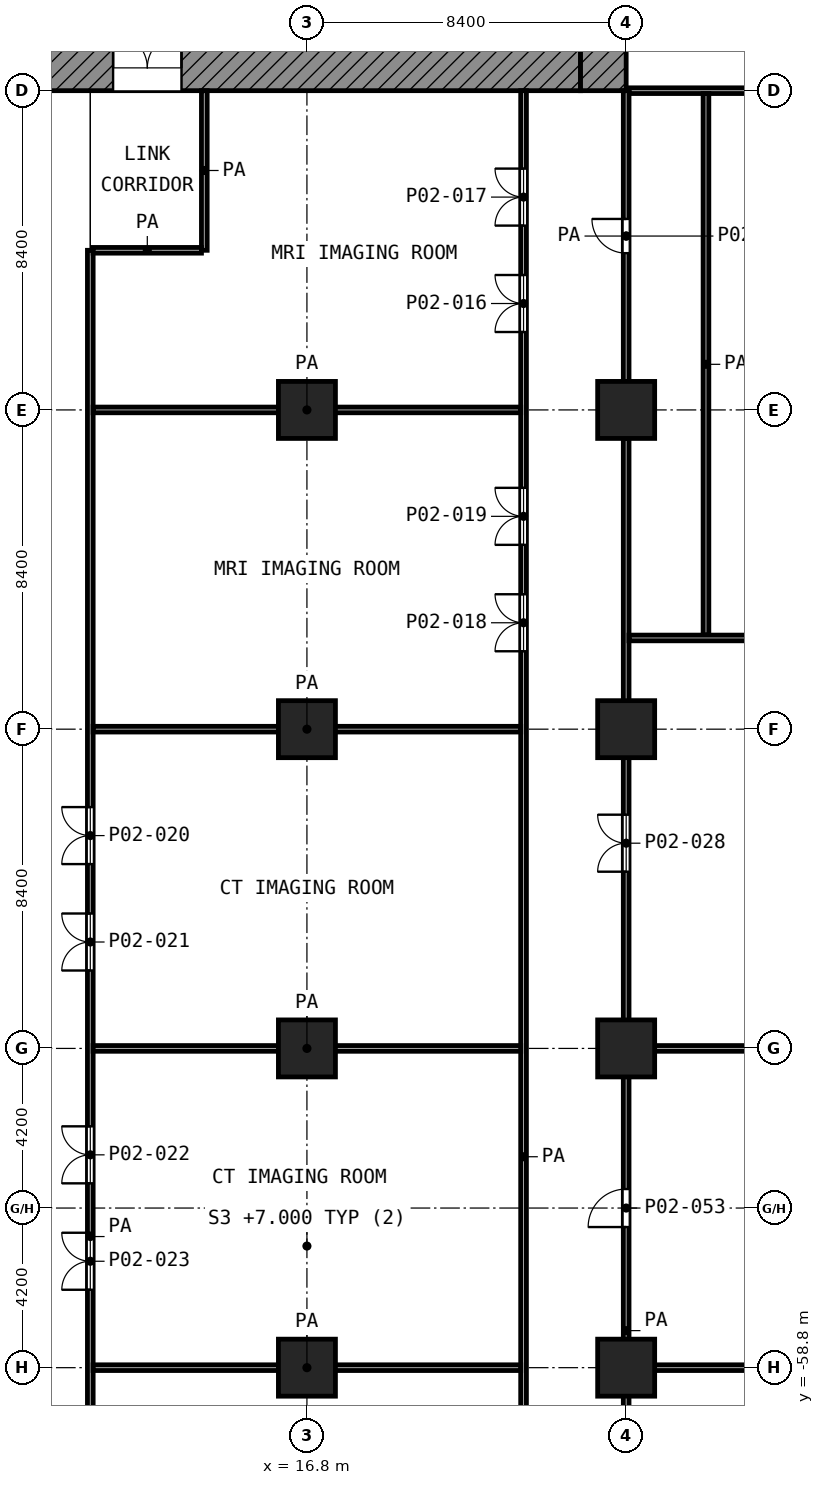
"""IFC4 building model, lengths in metres.
Left out: names, types, materials, properties, quantities, classifications, styles, units other than length and angle.
Written with IfcOpenShell. Run it as: python <this file> out.ifc"""

import sys

from ifc_helpers import new_model, si_unit, direction, frame, frame_2d, origin, origin_2d, place, context, subcontext, project, spatial, rectangle, extrude, element, fill, save


model = new_model("IFC4")
c1 = context("Model", 3, precision=1e-05, world=origin(), true_north=direction((0.0, 1.0)))
c2 = subcontext(c1, "Body", "Model", "MODEL_VIEW")
j1 = project(units=[si_unit("LENGTHUNIT", "METRE"), si_unit("PLANEANGLEUNIT", "RADIAN")], contexts=[c1])
p1 = place(None, origin())
s1 = spatial("IfcSite", under=j1, at=p1, CompositionType="ELEMENT")
p2 = place(p1, origin())
s2 = spatial("IfcBuilding", under=s1, at=p2, CompositionType="ELEMENT")
p3 = place(p2, frame((0.0, 0.0, 7.0)))
s3 = spatial("IfcBuildingStorey", under=s2, at=p3, CompositionType="ELEMENT", Elevation=7.0)
for number, where, z_axis, x_axis in (
    (1, (16.8, -33.6, 0.0), (0.0, 0.0, 1.0), (1.0, 0.0, 0.0)),
    (2, (25.2, -33.6, 0.0), (0.0, 0.0, 1.0), (1.0, 0.0, 0.0)),
    (3, (16.8, -42.0, 0.0), (0.0, 0.0, 1.0), (1.0, 0.0, 0.0)),
    (4, (25.2, -42.0, 0.0), (0.0, 0.0, 1.0), (1.0, 0.0, 0.0)),
    (5, (16.8, -50.4, 0.0), (0.0, 0.0, 1.0), (1.0, 0.0, 0.0)),
    (6, (25.2, -50.4, 0.0), (0.0, 0.0, 1.0), (1.0, 0.0, 0.0)),
    (7, (16.8, -58.8, 0.0), (0.0, 0.0, 1.0), (1.0, 0.0, 0.0)),
    (8, (25.2, -58.8, 0.0), (0.0, 0.0, 1.0), (1.0, 0.0, 0.0)),
):
    element("IfcColumn", number, at=place(p3, frame(where, z_axis=z_axis, x_axis=x_axis)), inside=s3, PredefinedType="COLUMN", context=c2, shape_type="SweptSolid", body=[
        extrude(rectangle(XDim=1.5, YDim=1.5, at=origin_2d()), origin(), (0.0, 0.0, 1.0), 5.6),
    ])
p4 = place(p3, frame((5.4, -24.6, 0.0), z_axis=(0.0, 0.0, 1.0), x_axis=(1.0, 0.0, 0.0)))
e9 = element("IfcWall", 9, at=p4, inside=s3, PredefinedType="SHEAR", context=c2, shape_type="SweptSolid", body=[
    extrude(rectangle(XDim=18.6, YDim=1.2, at=frame_2d((9.3, 0.0))), origin(), (0.0, 0.0, 1.0), 5.25),
])
p5 = place(p4, frame((6.3, 0.0, 0.0)))
e10 = element("IfcOpeningElement", 10, at=p5, cuts=e9, PredefinedType="OPENING", context=c2, shape_type="SweptSolid", body=[
    extrude(rectangle(XDim=1.8, YDim=2.1, at=frame_2d((0.9, 1.05))), frame((0.0, 0.61, 0.0), z_axis=(0.0, -1.0, 0.0), x_axis=(1.0, 0.0, 0.0)), (0.0, 0.0, 1.0), 1.22),
])
p6 = place(p3, frame((24.6, -25.2, 0.0), z_axis=(0.0, 0.0, 1.0), x_axis=(0.0, 1.0, 0.0)))
e11 = element("IfcWall", 11, at=p6, inside=s3, PredefinedType="SHEAR", context=c2, shape_type="SweptSolid", body=[
    extrude(rectangle(XDim=1.2, YDim=1.2, at=frame_2d((0.6, 0.0))), origin(), (0.0, 0.0, 1.0), 5.25),
])
p7 = place(p3, frame((11.175, -58.8, 0.0), z_axis=(0.0, 0.0, 1.0), x_axis=(1.0, 0.0, 0.0)))
e12 = element("IfcWall", 12, at=p7, inside=s3, PredefinedType="PARTITIONING", context=c2, shape_type="SweptSolid", body=[
    extrude(rectangle(XDim=11.25, YDim=0.15, at=frame_2d((5.625, 0.0))), origin(), (0.0, 0.0, 1.0), 5.25),
])
p8 = place(p3, frame((25.275, -58.8, 0.0), z_axis=(0.0, 0.0, 1.0), x_axis=(1.0, 0.0, 0.0)))
e13 = element("IfcWall", 13, at=p8, inside=s3, PredefinedType="PARTITIONING", context=c2, shape_type="SweptSolid", body=[
    extrude(rectangle(XDim=8.805, YDim=0.15, at=frame_2d((4.403, 0.0))), origin(), (0.0, 0.0, 1.0), 4.35),
])
p9 = place(p3, frame((11.175, -50.4, 0.0), z_axis=(0.0, 0.0, 1.0), x_axis=(1.0, 0.0, 0.0)))
e14 = element("IfcWall", 14, at=p9, inside=s3, PredefinedType="PARTITIONING", context=c2, shape_type="SweptSolid", body=[
    extrude(rectangle(XDim=11.25, YDim=0.15, at=frame_2d((5.625, 0.0))), origin(), (0.0, 0.0, 1.0), 5.25),
])
p10 = place(p3, frame((25.275, -50.4, 0.0), z_axis=(0.0, 0.0, 1.0), x_axis=(1.0, 0.0, 0.0)))
e15 = element("IfcWall", 15, at=p10, inside=s3, PredefinedType="PARTITIONING", context=c2, shape_type="SweptSolid", body=[
    extrude(rectangle(XDim=8.805, YDim=0.15, at=frame_2d((4.403, 0.0))), origin(), (0.0, 0.0, 1.0), 4.35),
])
p11 = place(p3, frame((11.175, -42.0, 0.0), z_axis=(0.0, 0.0, 1.0), x_axis=(1.0, 0.0, 0.0)))
e16 = element("IfcWall", 16, at=p11, inside=s3, PredefinedType="PARTITIONING", context=c2, shape_type="SweptSolid", body=[
    extrude(rectangle(XDim=11.25, YDim=0.15, at=frame_2d((5.625, 0.0))), origin(), (0.0, 0.0, 1.0), 5.25),
])
p12 = place(p3, frame((25.275, -39.6, 0.0), z_axis=(0.0, 0.0, 1.0), x_axis=(1.0, 0.0, 0.0)))
e17 = element("IfcWall", 17, at=p12, inside=s3, PredefinedType="PARTITIONING", context=c2, shape_type="SweptSolid", body=[
    extrude(rectangle(XDim=9.412, YDim=0.15, at=frame_2d((4.706, 0.0))), origin(), (0.0, 0.0, 1.0), 5.25),
])
p13 = place(p3, frame((11.175, -33.6, 0.0), z_axis=(0.0, 0.0, 1.0), x_axis=(1.0, 0.0, 0.0)))
e18 = element("IfcWall", 18, at=p13, inside=s3, PredefinedType="PARTITIONING", context=c2, shape_type="SweptSolid", body=[
    extrude(rectangle(XDim=11.25, YDim=0.15, at=frame_2d((5.625, 0.0))), origin(), (0.0, 0.0, 1.0), 5.25),
])
p14 = place(p3, frame((11.175, -29.4, 0.0), z_axis=(0.0, 0.0, 1.0), x_axis=(1.0, 0.0, 0.0)))
e19 = element("IfcWall", 19, at=p14, inside=s3, PredefinedType="PARTITIONING", context=c2, shape_type="SweptSolid", body=[
    extrude(rectangle(XDim=2.85, YDim=0.15, at=frame_2d((1.425, 0.0))), origin(), (0.0, 0.0, 1.0), 5.25),
])
p15 = place(p3, frame((25.275, -25.2, 0.0), z_axis=(0.0, 0.0, 1.0), x_axis=(1.0, 0.0, 0.0)))
e20 = element("IfcWall", 20, at=p15, inside=s3, PredefinedType="PARTITIONING", context=c2, shape_type="SweptSolid", body=[
    extrude(rectangle(XDim=32.325, YDim=0.15, at=frame_2d((16.163, 0.0))), origin(), (0.0, 0.0, 1.0), 5.25),
])
p16 = place(p15, frame((18.625, 0.0, 0.0)))
e21 = element("IfcOpeningElement", 21, at=p16, cuts=e20, PredefinedType="OPENING", context=c2, shape_type="SweptSolid", body=[
    extrude(rectangle(XDim=1.0, YDim=2.1, at=frame_2d((0.5, 1.05))), frame((0.0, 0.085, 0.0), z_axis=(0.0, -1.0, 0.0), x_axis=(1.0, 0.0, 0.0)), (0.0, 0.0, 1.0), 0.17),
])
p17 = place(p15, frame((22.825, 0.0, 0.0)))
e22 = element("IfcOpeningElement", 22, at=p17, cuts=e20, PredefinedType="OPENING", context=c2, shape_type="SweptSolid", body=[
    extrude(rectangle(XDim=1.0, YDim=2.1, at=frame_2d((0.5, 1.05))), frame((0.0, 0.085, 0.0), z_axis=(0.0, -1.0, 0.0), x_axis=(1.0, 0.0, 0.0)), (0.0, 0.0, 1.0), 0.17),
])
p18 = place(p15, frame((26.575, 0.0, 0.0)))
e23 = element("IfcOpeningElement", 23, at=p18, cuts=e20, PredefinedType="OPENING", context=c2, shape_type="SweptSolid", body=[
    extrude(rectangle(XDim=1.0, YDim=2.1, at=frame_2d((0.5, 1.05))), frame((0.0, 0.085, 0.0), z_axis=(0.0, -1.0, 0.0), x_axis=(1.0, 0.0, 0.0)), (0.0, 0.0, 1.0), 0.17),
])
p19 = place(p15, frame((30.175, 0.0, 0.0)))
e24 = element("IfcOpeningElement", 24, at=p19, cuts=e20, PredefinedType="OPENING", context=c2, shape_type="SweptSolid", body=[
    extrude(rectangle(XDim=1.0, YDim=2.1, at=frame_2d((0.5, 1.05))), frame((0.0, 0.085, 0.0), z_axis=(0.0, -1.0, 0.0), x_axis=(1.0, 0.0, 0.0)), (0.0, 0.0, 1.0), 0.17),
])
p20 = place(p15, frame((9.125, 0.0, 0.0)))
e25 = element("IfcOpeningElement", 25, at=p20, cuts=e20, PredefinedType="OPENING", context=c2, shape_type="SweptSolid", body=[
    extrude(rectangle(XDim=1.5, YDim=2.1, at=frame_2d((0.75, 1.05))), frame((0.0, 0.085, 0.0), z_axis=(0.0, -1.0, 0.0), x_axis=(1.0, 0.0, 0.0)), (0.0, 0.0, 1.0), 0.17),
])
p21 = place(p3, frame((11.1, -81.3, 0.0), z_axis=(0.0, 0.0, 1.0), x_axis=(0.0, 1.0, 0.0)))
e26 = element("IfcWall", 26, at=p21, inside=s3, PredefinedType="PARTITIONING", context=c2, shape_type="SweptSolid", body=[
    extrude(rectangle(XDim=51.9, YDim=0.15, at=frame_2d((25.95, 0.0))), origin(), (0.0, 0.0, 1.0), 5.25),
])
p22 = place(p21, frame((35.75, 0.0, 0.0)))
e27 = element("IfcOpeningElement", 27, at=p22, cuts=e26, PredefinedType="OPENING", context=c2, shape_type="SweptSolid", body=[
    extrude(rectangle(XDim=1.5, YDim=2.1, at=frame_2d((0.75, 1.05))), frame((0.0, 0.085, 0.0), z_axis=(0.0, -1.0, 0.0), x_axis=(1.0, 0.0, 0.0)), (0.0, 0.0, 1.0), 0.17),
])
p23 = place(p21, frame((32.95, 0.0, 0.0)))
e28 = element("IfcOpeningElement", 28, at=p23, cuts=e26, PredefinedType="OPENING", context=c2, shape_type="SweptSolid", body=[
    extrude(rectangle(XDim=1.5, YDim=2.1, at=frame_2d((0.75, 1.05))), frame((0.0, 0.085, 0.0), z_axis=(0.0, -1.0, 0.0), x_axis=(1.0, 0.0, 0.0)), (0.0, 0.0, 1.0), 0.17),
])
p24 = place(p21, frame((27.35, 0.0, 0.0)))
e29 = element("IfcOpeningElement", 29, at=p24, cuts=e26, PredefinedType="OPENING", context=c2, shape_type="SweptSolid", body=[
    extrude(rectangle(XDim=1.5, YDim=2.1, at=frame_2d((0.75, 1.05))), frame((0.0, 0.085, 0.0), z_axis=(0.0, -1.0, 0.0), x_axis=(1.0, 0.0, 0.0)), (0.0, 0.0, 1.0), 0.17),
])
p25 = place(p21, frame((24.55, 0.0, 0.0)))
e30 = element("IfcOpeningElement", 30, at=p25, cuts=e26, PredefinedType="OPENING", context=c2, shape_type="SweptSolid", body=[
    extrude(rectangle(XDim=1.5, YDim=2.1, at=frame_2d((0.75, 1.05))), frame((0.0, 0.085, 0.0), z_axis=(0.0, -1.0, 0.0), x_axis=(1.0, 0.0, 0.0)), (0.0, 0.0, 1.0), 0.17),
])
p26 = place(p21, frame((10.55, 0.0, 0.0)))
e31 = element("IfcOpeningElement", 31, at=p26, cuts=e26, PredefinedType="OPENING", context=c2, shape_type="SweptSolid", body=[
    extrude(rectangle(XDim=1.5, YDim=2.1, at=frame_2d((0.75, 1.05))), frame((0.0, 0.085, 0.0), z_axis=(0.0, -1.0, 0.0), x_axis=(1.0, 0.0, 0.0)), (0.0, 0.0, 1.0), 0.17),
])
p27 = place(p21, frame((7.75, 0.0, 0.0)))
e32 = element("IfcOpeningElement", 32, at=p27, cuts=e26, PredefinedType="OPENING", context=c2, shape_type="SweptSolid", body=[
    extrude(rectangle(XDim=1.5, YDim=2.1, at=frame_2d((0.75, 1.05))), frame((0.0, 0.085, 0.0), z_axis=(0.0, -1.0, 0.0), x_axis=(1.0, 0.0, 0.0)), (0.0, 0.0, 1.0), 0.17),
])
p28 = place(p3, frame((14.1, -29.4, 0.0), z_axis=(0.0, 0.0, 1.0), x_axis=(0.0, 1.0, 0.0)))
e33 = element("IfcWall", 33, at=p28, inside=s3, PredefinedType="PARTITIONING", context=c2, shape_type="SweptSolid", body=[
    extrude(rectangle(XDim=4.2, YDim=0.15, at=frame_2d((2.1, 0.0))), origin(), (0.0, 0.0, 1.0), 5.25),
])
p29 = place(p3, frame((22.5, -81.3, 0.0), z_axis=(0.0, 0.0, 1.0), x_axis=(0.0, 1.0, 0.0)))
e34 = element("IfcWall", 34, at=p29, inside=s3, PredefinedType="PARTITIONING", context=c2, shape_type="SweptSolid", body=[
    extrude(rectangle(XDim=56.1, YDim=0.15, at=frame_2d((28.05, 0.0))), origin(), (0.0, 0.0, 1.0), 5.25),
])
p30 = place(p29, frame((49.75, 0.0, 0.0)))
e35 = element("IfcOpeningElement", 35, at=p30, cuts=e34, PredefinedType="OPENING", context=c2, shape_type="SweptSolid", body=[
    extrude(rectangle(XDim=1.5, YDim=2.1, at=frame_2d((0.75, 1.05))), frame((0.0, 0.085, 0.0), z_axis=(0.0, -1.0, 0.0), x_axis=(1.0, 0.0, 0.0)), (0.0, 0.0, 1.0), 0.17),
])
p31 = place(p29, frame((52.55, 0.0, 0.0)))
e36 = element("IfcOpeningElement", 36, at=p31, cuts=e34, PredefinedType="OPENING", context=c2, shape_type="SweptSolid", body=[
    extrude(rectangle(XDim=1.5, YDim=2.1, at=frame_2d((0.75, 1.05))), frame((0.0, 0.085, 0.0), z_axis=(0.0, -1.0, 0.0), x_axis=(1.0, 0.0, 0.0)), (0.0, 0.0, 1.0), 0.17),
])
p32 = place(p29, frame((41.35, 0.0, 0.0)))
e37 = element("IfcOpeningElement", 37, at=p32, cuts=e34, PredefinedType="OPENING", context=c2, shape_type="SweptSolid", body=[
    extrude(rectangle(XDim=1.5, YDim=2.1, at=frame_2d((0.75, 1.05))), frame((0.0, 0.085, 0.0), z_axis=(0.0, -1.0, 0.0), x_axis=(1.0, 0.0, 0.0)), (0.0, 0.0, 1.0), 0.17),
])
p33 = place(p29, frame((44.15, 0.0, 0.0)))
e38 = element("IfcOpeningElement", 38, at=p33, cuts=e34, PredefinedType="OPENING", context=c2, shape_type="SweptSolid", body=[
    extrude(rectangle(XDim=1.5, YDim=2.1, at=frame_2d((0.75, 1.05))), frame((0.0, 0.085, 0.0), z_axis=(0.0, -1.0, 0.0), x_axis=(1.0, 0.0, 0.0)), (0.0, 0.0, 1.0), 0.17),
])
p34 = place(p29, frame((16.15, 0.0, 0.0)))
e39 = element("IfcOpeningElement", 39, at=p34, cuts=e34, PredefinedType="OPENING", context=c2, shape_type="SweptSolid", body=[
    extrude(rectangle(XDim=1.5, YDim=2.1, at=frame_2d((0.75, 1.05))), frame((0.0, 0.085, 0.0), z_axis=(0.0, -1.0, 0.0), x_axis=(1.0, 0.0, 0.0)), (0.0, 0.0, 1.0), 0.17),
])
p35 = place(p29, frame((18.95, 0.0, 0.0)))
e40 = element("IfcOpeningElement", 40, at=p35, cuts=e34, PredefinedType="OPENING", context=c2, shape_type="SweptSolid", body=[
    extrude(rectangle(XDim=1.5, YDim=2.1, at=frame_2d((0.75, 1.05))), frame((0.0, 0.085, 0.0), z_axis=(0.0, -1.0, 0.0), x_axis=(1.0, 0.0, 0.0)), (0.0, 0.0, 1.0), 0.17),
])
p36 = place(p3, frame((25.2, -81.3, 0.0), z_axis=(0.0, 0.0, 1.0), x_axis=(0.0, 1.0, 0.0)))
e41 = element("IfcWall", 41, at=p36, inside=s3, PredefinedType="PARTITIONING", context=c2, shape_type="SweptSolid", body=[
    extrude(rectangle(XDim=46.95, YDim=0.15, at=frame_2d((23.475, 0.0))), origin(), (0.0, 0.0, 1.0), 5.25),
])
p37 = place(p36, frame((35.55, 0.0, 0.0)))
e42 = element("IfcOpeningElement", 42, at=p37, cuts=e41, PredefinedType="OPENING", context=c2, shape_type="SweptSolid", body=[
    extrude(rectangle(XDim=1.5, YDim=2.1, at=frame_2d((0.75, 1.05))), frame((0.0, 0.085, 0.0), z_axis=(0.0, -1.0, 0.0), x_axis=(1.0, 0.0, 0.0)), (0.0, 0.0, 1.0), 0.17),
])
p38 = place(p36, frame((26.2, 0.0, 0.0)))
e43 = element("IfcOpeningElement", 43, at=p38, cuts=e41, PredefinedType="OPENING", context=c2, shape_type="SweptSolid", body=[
    extrude(rectangle(XDim=1.0, YDim=2.1, at=frame_2d((0.5, 1.05))), frame((0.0, 0.085, 0.0), z_axis=(0.0, -1.0, 0.0), x_axis=(1.0, 0.0, 0.0)), (0.0, 0.0, 1.0), 0.17),
])
p39 = place(p36, frame((19.75, 0.0, 0.0)))
e44 = element("IfcOpeningElement", 44, at=p39, cuts=e41, PredefinedType="OPENING", context=c2, shape_type="SweptSolid", body=[
    extrude(rectangle(XDim=1.0, YDim=2.1, at=frame_2d((0.5, 1.05))), frame((0.0, 0.085, 0.0), z_axis=(0.0, -1.0, 0.0), x_axis=(1.0, 0.0, 0.0)), (0.0, 0.0, 1.0), 0.17),
])
p40 = place(p36, frame((15.55, 0.0, 0.0)))
e45 = element("IfcOpeningElement", 45, at=p40, cuts=e41, PredefinedType="OPENING", context=c2, shape_type="SweptSolid", body=[
    extrude(rectangle(XDim=1.0, YDim=2.1, at=frame_2d((0.5, 1.05))), frame((0.0, 0.085, 0.0), z_axis=(0.0, -1.0, 0.0), x_axis=(1.0, 0.0, 0.0)), (0.0, 0.0, 1.0), 0.17),
])
p41 = place(p36, frame((11.8, 0.0, 0.0)))
e46 = element("IfcOpeningElement", 46, at=p41, cuts=e41, PredefinedType="OPENING", context=c2, shape_type="SweptSolid", body=[
    extrude(rectangle(XDim=1.0, YDim=2.1, at=frame_2d((0.5, 1.05))), frame((0.0, 0.085, 0.0), z_axis=(0.0, -1.0, 0.0), x_axis=(1.0, 0.0, 0.0)), (0.0, 0.0, 1.0), 0.17),
])
p42 = place(p36, frame((6.5, 0.0, 0.0)))
e47 = element("IfcOpeningElement", 47, at=p42, cuts=e41, PredefinedType="OPENING", context=c2, shape_type="SweptSolid", body=[
    extrude(rectangle(XDim=1.0, YDim=2.1, at=frame_2d((0.5, 1.05))), frame((0.0, 0.085, 0.0), z_axis=(0.0, -1.0, 0.0), x_axis=(1.0, 0.0, 0.0)), (0.0, 0.0, 1.0), 0.17),
])
p43 = place(p3, frame((25.2, -32.85, 0.0), z_axis=(0.0, 0.0, 1.0), x_axis=(0.0, 1.0, 0.0)))
e48 = element("IfcWall", 48, at=p43, inside=s3, PredefinedType="PARTITIONING", context=c2, shape_type="SweptSolid", body=[
    extrude(rectangle(XDim=7.65, YDim=0.15, at=frame_2d((3.825, 0.0))), origin(), (0.0, 0.0, 1.0), 5.25),
])
p44 = place(p43, frame((3.375, 0.0, 0.0)))
e49 = element("IfcOpeningElement", 49, at=p44, cuts=e48, PredefinedType="OPENING", context=c2, shape_type="SweptSolid", body=[
    extrude(rectangle(XDim=0.9, YDim=2.1, at=frame_2d((0.45, 1.05))), frame((0.0, 0.085, 0.0), z_axis=(0.0, -1.0, 0.0), x_axis=(1.0, 0.0, 0.0)), (0.0, 0.0, 1.0), 0.17),
])
p45 = place(p3, frame((27.3, -39.525, 0.0), z_axis=(0.0, 0.0, 1.0), x_axis=(0.0, 1.0, 0.0)))
e50 = element("IfcWall", 50, at=p45, inside=s3, PredefinedType="PARTITIONING", context=c2, shape_type="SweptSolid", body=[
    extrude(rectangle(XDim=14.25, YDim=0.15, at=frame_2d((7.125, 0.0))), origin(), (0.0, 0.0, 1.0), 5.25),
])
p46 = place(p5, origin())
e51 = element("IfcDoor", 51, at=p46, inside=s3, OperationType="DOUBLE_DOOR_SINGLE_SWING", PredefinedType="DOOR", context=c2, shape_type="SweptSolid", body=[
    extrude(rectangle(XDim=1.8, YDim=2.1, at=frame_2d((0.9, 1.05))), frame((0.0, 0.025, 0.0), z_axis=(0.0, -1.0, 0.0), x_axis=(1.0, 0.0, 0.0)), (0.0, 0.0, 1.0), 0.05),
])
fill(e10, e51)
p47 = place(p30, origin())
e52 = element("IfcDoor", 52, at=p47, inside=s3, OperationType="DOUBLE_DOOR_SINGLE_SWING", PredefinedType="DOOR", context=c2, shape_type="SweptSolid", body=[
    extrude(rectangle(XDim=1.5, YDim=2.1, at=frame_2d((0.75, 1.05))), frame((0.0, 0.025, 0.0), z_axis=(0.0, -1.0, 0.0), x_axis=(1.0, 0.0, 0.0)), (0.0, 0.0, 1.0), 0.05),
])
fill(e35, e52)
p48 = place(p31, origin())
e53 = element("IfcDoor", 53, at=p48, inside=s3, OperationType="DOUBLE_DOOR_SINGLE_SWING", PredefinedType="DOOR", context=c2, shape_type="SweptSolid", body=[
    extrude(rectangle(XDim=1.5, YDim=2.1, at=frame_2d((0.75, 1.05))), frame((0.0, 0.025, 0.0), z_axis=(0.0, -1.0, 0.0), x_axis=(1.0, 0.0, 0.0)), (0.0, 0.0, 1.0), 0.05),
])
fill(e36, e53)
p49 = place(p32, origin())
e54 = element("IfcDoor", 54, at=p49, inside=s3, OperationType="DOUBLE_DOOR_SINGLE_SWING", PredefinedType="DOOR", context=c2, shape_type="SweptSolid", body=[
    extrude(rectangle(XDim=1.5, YDim=2.1, at=frame_2d((0.75, 1.05))), frame((0.0, 0.025, 0.0), z_axis=(0.0, -1.0, 0.0), x_axis=(1.0, 0.0, 0.0)), (0.0, 0.0, 1.0), 0.05),
])
fill(e37, e54)
p50 = place(p33, origin())
e55 = element("IfcDoor", 55, at=p50, inside=s3, OperationType="DOUBLE_DOOR_SINGLE_SWING", PredefinedType="DOOR", context=c2, shape_type="SweptSolid", body=[
    extrude(rectangle(XDim=1.5, YDim=2.1, at=frame_2d((0.75, 1.05))), frame((0.0, 0.025, 0.0), z_axis=(0.0, -1.0, 0.0), x_axis=(1.0, 0.0, 0.0)), (0.0, 0.0, 1.0), 0.05),
])
fill(e38, e55)
p51 = place(p22, origin())
e56 = element("IfcDoor", 56, at=p51, inside=s3, OperationType="DOUBLE_DOOR_SINGLE_SWING", PredefinedType="DOOR", context=c2, shape_type="SweptSolid", body=[
    extrude(rectangle(XDim=1.5, YDim=2.1, at=frame_2d((0.75, 1.05))), frame((0.0, 0.025, 0.0), z_axis=(0.0, -1.0, 0.0), x_axis=(1.0, 0.0, 0.0)), (0.0, 0.0, 1.0), 0.05),
])
fill(e27, e56)
p52 = place(p23, origin())
e57 = element("IfcDoor", 57, at=p52, inside=s3, OperationType="DOUBLE_DOOR_SINGLE_SWING", PredefinedType="DOOR", context=c2, shape_type="SweptSolid", body=[
    extrude(rectangle(XDim=1.5, YDim=2.1, at=frame_2d((0.75, 1.05))), frame((0.0, 0.025, 0.0), z_axis=(0.0, -1.0, 0.0), x_axis=(1.0, 0.0, 0.0)), (0.0, 0.0, 1.0), 0.05),
])
fill(e28, e57)
p53 = place(p24, origin())
e58 = element("IfcDoor", 58, at=p53, inside=s3, OperationType="DOUBLE_DOOR_SINGLE_SWING", PredefinedType="DOOR", context=c2, shape_type="SweptSolid", body=[
    extrude(rectangle(XDim=1.5, YDim=2.1, at=frame_2d((0.75, 1.05))), frame((0.0, 0.025, 0.0), z_axis=(0.0, -1.0, 0.0), x_axis=(1.0, 0.0, 0.0)), (0.0, 0.0, 1.0), 0.05),
])
fill(e29, e58)
p54 = place(p25, origin())
e59 = element("IfcDoor", 59, at=p54, inside=s3, OperationType="DOUBLE_DOOR_SINGLE_SWING", PredefinedType="DOOR", context=c2, shape_type="SweptSolid", body=[
    extrude(rectangle(XDim=1.5, YDim=2.1, at=frame_2d((0.75, 1.05))), frame((0.0, 0.025, 0.0), z_axis=(0.0, -1.0, 0.0), x_axis=(1.0, 0.0, 0.0)), (0.0, 0.0, 1.0), 0.05),
])
fill(e30, e59)
p55 = place(p37, origin())
e60 = element("IfcDoor", 60, at=p55, inside=s3, OperationType="DOUBLE_DOOR_SINGLE_SWING", PredefinedType="DOOR", context=c2, shape_type="SweptSolid", body=[
    extrude(rectangle(XDim=1.5, YDim=2.1, at=frame_2d((0.75, 1.05))), frame((0.0, 0.025, 0.0), z_axis=(0.0, -1.0, 0.0), x_axis=(1.0, 0.0, 0.0)), (0.0, 0.0, 1.0), 0.05),
])
fill(e42, e60)
p56 = place(p38, origin())
e61 = element("IfcDoor", 61, at=p56, inside=s3, OperationType="SINGLE_SWING_LEFT", PredefinedType="DOOR", context=c2, shape_type="SweptSolid", body=[
    extrude(rectangle(XDim=1.0, YDim=2.1, at=frame_2d((0.5, 1.05))), frame((0.0, 0.025, 0.0), z_axis=(0.0, -1.0, 0.0), x_axis=(1.0, 0.0, 0.0)), (0.0, 0.0, 1.0), 0.05),
])
fill(e43, e61)
p57 = place(p44, origin())
e62 = element("IfcDoor", 62, at=p57, inside=s3, OperationType="SINGLE_SWING_RIGHT", PredefinedType="DOOR", context=c2, shape_type="SweptSolid", body=[
    extrude(rectangle(XDim=0.9, YDim=2.1, at=frame_2d((0.45, 1.05))), frame((0.0, 0.025, 0.0), z_axis=(0.0, -1.0, 0.0), x_axis=(1.0, 0.0, 0.0)), (0.0, 0.0, 1.0), 0.05),
])
fill(e49, e62)
save(model, sys.argv[1])
